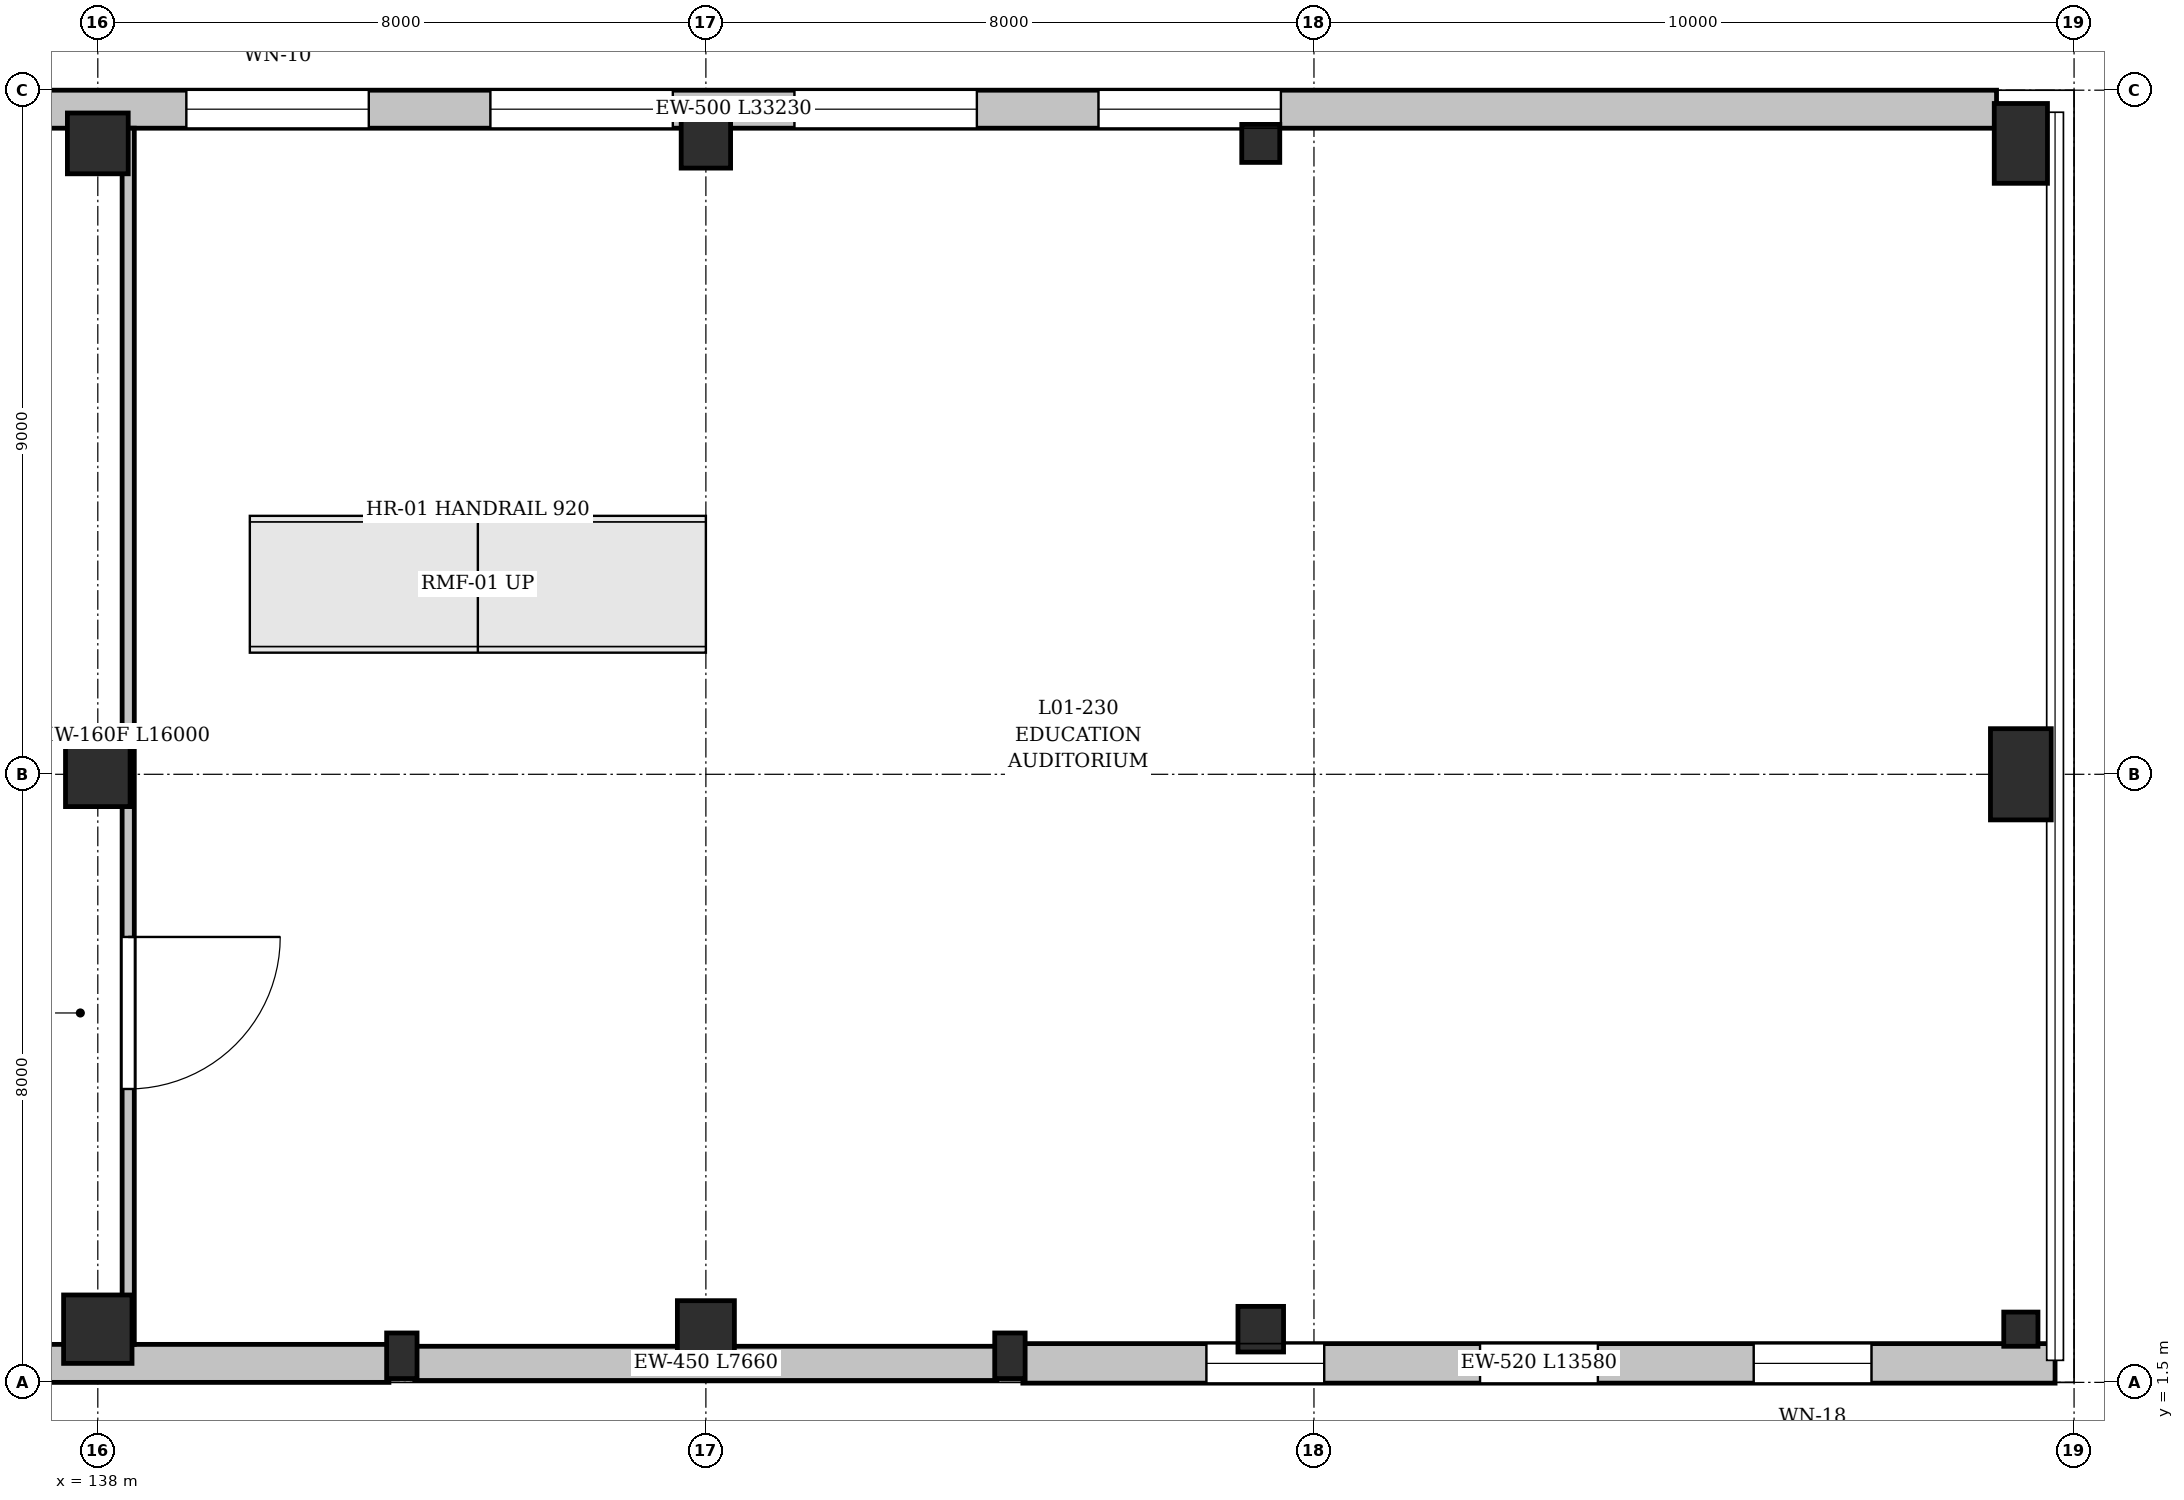
"""IFC4 building model, lengths in metres.
Left out: names, types, materials, properties, quantities, classifications, styles, units other than length and angle.
Written with IfcOpenShell. Run it as: python <this file> out.ifc"""

import sys

from ifc_helpers import new_model, si_unit, direction, frame, frame_2d, origin, origin_2d, place, context, subcontext, project, spatial, rectangle, extrude, element, fill, save


model = new_model("IFC4")
c1 = context("Model", 3, precision=1e-05, world=origin(), true_north=direction((0.0, 1.0)))
c2 = subcontext(c1, "Body", "Model", "MODEL_VIEW")
j1 = project(units=[si_unit("LENGTHUNIT", "METRE"), si_unit("PLANEANGLEUNIT", "RADIAN")], contexts=[c1])
p1 = place(None, origin())
s1 = spatial("IfcSite", under=j1, at=p1, CompositionType="ELEMENT")
p2 = place(p1, origin())
s2 = spatial("IfcBuilding", under=s1, at=p2, CompositionType="ELEMENT")
p3 = place(p2, origin())
s3 = spatial("IfcBuildingStorey", under=s2, at=p3, CompositionType="ELEMENT", Elevation=0.0)
p4 = place(p3, frame((138.0, 2.2, 0.0), z_axis=(0.0, 0.0, 1.0), x_axis=(1.0, 0.0, 0.0)))
e1 = element("IfcColumn", 1, at=p4, inside=s3, PredefinedType="COLUMN", context=c2, shape_type="SweptSolid", body=[
    extrude(rectangle(XDim=0.9, YDim=0.9, at=origin_2d()), origin(), (0.0, 0.0, 1.0), 5.05),
])
p5 = place(p3, frame((138.0, 9.5, 0.0), z_axis=(0.0, 0.0, 1.0), x_axis=(1.0, 0.0, 0.0)))
e2 = element("IfcColumn", 2, at=p5, inside=s3, PredefinedType="COLUMN", context=c2, shape_type="SweptSolid", body=[
    extrude(rectangle(XDim=0.85, YDim=0.85, at=origin_2d()), origin(), (0.0, 0.0, 1.0), 5.05),
])
p6 = place(p3, frame((138.0, 17.8, 0.0), z_axis=(0.0, 0.0, 1.0), x_axis=(1.0, 0.0, 0.0)))
e3 = element("IfcColumn", 3, at=p6, inside=s3, PredefinedType="COLUMN", context=c2, shape_type="SweptSolid", body=[
    extrude(rectangle(XDim=0.8, YDim=0.8, at=origin_2d()), origin(), (0.0, 0.0, 1.0), 5.05),
])
p7 = place(p3, frame((146.0, 2.2, 0.0), z_axis=(0.0, 0.0, 1.0), x_axis=(1.0, 0.0, 0.0)))
e4 = element("IfcColumn", 4, at=p7, inside=s3, PredefinedType="COLUMN", context=c2, shape_type="SweptSolid", body=[
    extrude(rectangle(XDim=0.75, YDim=0.75, at=origin_2d()), origin(), (0.0, 0.0, 1.0), 5.05),
])
p8 = place(p3, frame((146.0, 17.8, 0.0), z_axis=(0.0, 0.0, 1.0), x_axis=(1.0, 0.0, 0.0)))
e5 = element("IfcColumn", 5, at=p8, inside=s3, PredefinedType="COLUMN", context=c2, shape_type="SweptSolid", body=[
    extrude(rectangle(XDim=0.65, YDim=0.65, at=origin_2d()), origin(), (0.0, 0.0, 1.0), 5.05),
])
p9 = place(p3, frame((153.3, 2.2, 0.0), z_axis=(0.0, 0.0, 1.0), x_axis=(1.0, 0.0, 0.0)))
e6 = element("IfcColumn", 6, at=p9, inside=s3, PredefinedType="COLUMN", context=c2, shape_type="SweptSolid", body=[
    extrude(rectangle(XDim=0.6, YDim=0.6, at=origin_2d()), origin(), (0.0, 0.0, 1.0), 5.05),
])
p10 = place(p3, frame((153.3, 17.8, 0.0), z_axis=(0.0, 0.0, 1.0), x_axis=(1.0, 0.0, 0.0)))
e7 = element("IfcColumn", 7, at=p10, inside=s3, PredefinedType="COLUMN", context=c2, shape_type="SweptSolid", body=[
    extrude(rectangle(XDim=0.5, YDim=0.5, at=origin_2d()), origin(), (0.0, 0.0, 1.0), 5.05),
])
p11 = place(p3, frame((163.3, 2.2, 0.0), z_axis=(0.0, 0.0, 1.0), x_axis=(1.0, 0.0, 0.0)))
e8 = element("IfcColumn", 8, at=p11, inside=s3, PredefinedType="COLUMN", context=c2, shape_type="SweptSolid", body=[
    extrude(rectangle(XDim=0.45, YDim=0.45, at=origin_2d()), origin(), (0.0, 0.0, 1.0), 5.05),
])
p12 = place(p3, frame((163.3, 9.5, 0.0), z_axis=(0.0, 0.0, 1.0), x_axis=(1.0, 0.0, 0.0)))
e9 = element("IfcColumn", 9, at=p12, inside=s3, PredefinedType="COLUMN", context=c2, shape_type="SweptSolid", body=[
    extrude(rectangle(XDim=0.8, YDim=1.2, at=origin_2d()), origin(), (0.0, 0.0, 1.0), 5.05),
])
p13 = place(p3, frame((163.3, 17.8, 0.0), z_axis=(0.0, 0.0, 1.0), x_axis=(1.0, 0.0, 0.0)))
e10 = element("IfcColumn", 10, at=p13, inside=s3, PredefinedType="COLUMN", context=c2, shape_type="SweptSolid", body=[
    extrude(rectangle(XDim=0.7, YDim=1.05, at=origin_2d()), origin(), (0.0, 0.0, 1.0), 5.05),
])
for number, where, z_axis, x_axis in (
    (11, (142.0, 1.85, 0.0), (0.0, 0.0, 1.0), (1.0, 0.0, 0.0)),
    (12, (150.0, 1.85, 0.0), (0.0, 0.0, 1.0), (1.0, 0.0, 0.0)),
):
    element("IfcColumn", number, at=place(p3, frame(where, z_axis=z_axis, x_axis=x_axis)), inside=s3, PredefinedType="PILASTER", context=c2, shape_type="SweptSolid", body=[
        extrude(rectangle(XDim=0.4, YDim=0.6, at=origin_2d()), origin(), (0.0, 0.0, 1.0), 5.05),
    ])
p14 = place(p3, frame((129.75, 18.25, 0.0), z_axis=(0.0, 0.0, 1.0), x_axis=(1.0, 0.0, 0.0)))
e13 = element("IfcWall", 13, at=p14, inside=s3, PredefinedType="SOLIDWALL", context=c2, shape_type="SweptSolid", body=[
    extrude(rectangle(XDim=33.23, YDim=0.5, at=frame_2d((16.615, 0.0))), origin(), (0.0, 0.0, 1.0), 3.24),
])
p15 = place(p14, frame((9.415, 0.0, 0.9)))
e14 = element("IfcOpeningElement", 14, at=p15, cuts=e13, PredefinedType="OPENING", context=c2, shape_type="SweptSolid", body=[
    extrude(rectangle(XDim=2.4, YDim=1.1, at=frame_2d((1.2, 0.55))), frame((0.0, 0.26, 0.0), z_axis=(0.0, -1.0, 0.0), x_axis=(1.0, 0.0, 0.0)), (0.0, 0.0, 1.0), 0.52),
])
p16 = place(p14, frame((13.415, 0.0, 0.9)))
e15 = element("IfcOpeningElement", 15, at=p16, cuts=e13, PredefinedType="OPENING", context=c2, shape_type="SweptSolid", body=[
    extrude(rectangle(XDim=2.4, YDim=1.1, at=frame_2d((1.2, 0.55))), frame((0.0, 0.26, 0.0), z_axis=(0.0, -1.0, 0.0), x_axis=(1.0, 0.0, 0.0)), (0.0, 0.0, 1.0), 0.52),
])
p17 = place(p14, frame((17.415, 0.0, 0.9)))
e16 = element("IfcOpeningElement", 16, at=p17, cuts=e13, PredefinedType="OPENING", context=c2, shape_type="SweptSolid", body=[
    extrude(rectangle(XDim=2.4, YDim=1.1, at=frame_2d((1.2, 0.55))), frame((0.0, 0.26, 0.0), z_axis=(0.0, -1.0, 0.0), x_axis=(1.0, 0.0, 0.0)), (0.0, 0.0, 1.0), 0.52),
])
p18 = place(p14, frame((21.415, 0.0, 0.9)))
e17 = element("IfcOpeningElement", 17, at=p18, cuts=e13, PredefinedType="OPENING", context=c2, shape_type="SweptSolid", body=[
    extrude(rectangle(XDim=2.4, YDim=1.1, at=frame_2d((1.2, 0.55))), frame((0.0, 0.26, 0.0), z_axis=(0.0, -1.0, 0.0), x_axis=(1.0, 0.0, 0.0)), (0.0, 0.0, 1.0), 0.52),
])
p19 = place(p3, frame((163.75, 1.75, 0.0), z_axis=(0.0, 0.0, 1.0), x_axis=(-1.0, 0.0, 0.0)))
e18 = element("IfcWall", 18, at=p19, inside=s3, PredefinedType="SOLIDWALL", context=c2, shape_type="SweptSolid", body=[
    extrude(rectangle(XDim=13.58, YDim=0.52, at=frame_2d((6.79, 0.0))), origin(), (0.0, 0.0, 1.0), 3.24),
])
p20 = place(p19, frame((2.415, 0.0, 0.9)))
e19 = element("IfcOpeningElement", 19, at=p20, cuts=e18, PredefinedType="OPENING", context=c2, shape_type="SweptSolid", body=[
    extrude(rectangle(XDim=1.55, YDim=1.85, at=frame_2d((0.775, 0.925))), frame((0.0, 0.27, 0.0), z_axis=(0.0, -1.0, 0.0), x_axis=(1.0, 0.0, 0.0)), (0.0, 0.0, 1.0), 0.54),
])
p21 = place(p19, frame((6.015, 0.0, 0.9)))
e20 = element("IfcOpeningElement", 20, at=p21, cuts=e18, PredefinedType="OPENING", context=c2, shape_type="SweptSolid", body=[
    extrude(rectangle(XDim=1.55, YDim=1.85, at=frame_2d((0.775, 0.925))), frame((0.0, 0.27, 0.0), z_axis=(0.0, -1.0, 0.0), x_axis=(1.0, 0.0, 0.0)), (0.0, 0.0, 1.0), 0.54),
])
p22 = place(p19, frame((9.615, 0.0, 0.9)))
e21 = element("IfcOpeningElement", 21, at=p22, cuts=e18, PredefinedType="OPENING", context=c2, shape_type="SweptSolid", body=[
    extrude(rectangle(XDim=1.55, YDim=1.85, at=frame_2d((0.775, 0.925))), frame((0.0, 0.27, 0.0), z_axis=(0.0, -1.0, 0.0), x_axis=(1.0, 0.0, 0.0)), (0.0, 0.0, 1.0), 0.54),
])
p23 = place(p3, frame((149.83, 1.75, 0.0), z_axis=(0.0, 0.0, 1.0), x_axis=(-1.0, 0.0, 0.0)))
e22 = element("IfcWall", 22, at=p23, inside=s3, PredefinedType="SOLIDWALL", context=c2, shape_type="SweptSolid", body=[
    extrude(rectangle(XDim=7.66, YDim=0.45, at=frame_2d((3.83, 0.0))), origin(), (0.0, 0.0, 1.0), 3.24),
])
p24 = place(p3, frame((141.83, 1.75, 0.0), z_axis=(0.0, 0.0, 1.0), x_axis=(-1.0, 0.0, 0.0)))
e23 = element("IfcWall", 23, at=p24, inside=s3, PredefinedType="SOLIDWALL", context=c2, shape_type="SweptSolid", body=[
    extrude(rectangle(XDim=7.46, YDim=0.5, at=frame_2d((3.73, 0.0))), origin(), (0.0, 0.0, 1.0), 4.04),
])
p25 = place(p3, frame((138.4, 18.0, 0.0), z_axis=(0.0, 0.0, 1.0), x_axis=(0.0, -1.0, 0.0)))
e24 = element("IfcWall", 24, at=p25, inside=s3, PredefinedType="PARTITIONING", context=c2, shape_type="SweptSolid", body=[
    extrude(rectangle(XDim=16.0, YDim=0.16, at=frame_2d((8.0, 0.0))), origin(), (0.0, 0.0, 1.0), 3.74),
])
p26 = place(p25, frame((10.64, 0.0, 0.0)))
e25 = element("IfcOpeningElement", 25, at=p26, cuts=e24, PredefinedType="OPENING", context=c2, shape_type="SweptSolid", body=[
    extrude(rectangle(XDim=2.0, YDim=2.4, at=frame_2d((1.0, 1.2))), frame((0.0, 0.09, 0.0), z_axis=(0.0, -1.0, 0.0), x_axis=(1.0, 0.0, 0.0)), (0.0, 0.0, 1.0), 0.18),
])
p27 = place(p15, origin())
e26 = element("IfcWindow", 26, at=p27, inside=s3, PartitioningType="DOUBLE_PANEL_HORIZONTAL", PredefinedType="LIGHTDOME", context=c2, shape_type="SweptSolid", body=[
    extrude(rectangle(XDim=2.4, YDim=1.1, at=frame_2d((1.2, 0.55))), frame((0.0, 0.03, 0.0), z_axis=(0.0, -1.0, 0.0), x_axis=(1.0, 0.0, 0.0)), (0.0, 0.0, 1.0), 0.06),
])
fill(e14, e26)
p28 = place(p16, origin())
e27 = element("IfcWindow", 27, at=p28, inside=s3, PartitioningType="DOUBLE_PANEL_HORIZONTAL", PredefinedType="LIGHTDOME", context=c2, shape_type="SweptSolid", body=[
    extrude(rectangle(XDim=2.4, YDim=1.1, at=frame_2d((1.2, 0.55))), frame((0.0, 0.03, 0.0), z_axis=(0.0, -1.0, 0.0), x_axis=(1.0, 0.0, 0.0)), (0.0, 0.0, 1.0), 0.06),
])
fill(e15, e27)
p29 = place(p17, origin())
e28 = element("IfcWindow", 28, at=p29, inside=s3, PartitioningType="DOUBLE_PANEL_HORIZONTAL", PredefinedType="LIGHTDOME", context=c2, shape_type="SweptSolid", body=[
    extrude(rectangle(XDim=2.4, YDim=1.1, at=frame_2d((1.2, 0.55))), frame((0.0, 0.03, 0.0), z_axis=(0.0, -1.0, 0.0), x_axis=(1.0, 0.0, 0.0)), (0.0, 0.0, 1.0), 0.06),
])
fill(e16, e28)
p30 = place(p18, origin())
e29 = element("IfcWindow", 29, at=p30, inside=s3, PartitioningType="DOUBLE_PANEL_HORIZONTAL", PredefinedType="LIGHTDOME", context=c2, shape_type="SweptSolid", body=[
    extrude(rectangle(XDim=2.4, YDim=1.1, at=frame_2d((1.2, 0.55))), frame((0.0, 0.03, 0.0), z_axis=(0.0, -1.0, 0.0), x_axis=(1.0, 0.0, 0.0)), (0.0, 0.0, 1.0), 0.06),
])
fill(e17, e29)
p31 = place(p20, origin())
e30 = element("IfcWindow", 30, at=p31, inside=s3, PartitioningType="DOUBLE_PANEL_VERTICAL", PredefinedType="WINDOW", context=c2, shape_type="SweptSolid", body=[
    extrude(rectangle(XDim=1.55, YDim=1.85, at=frame_2d((0.775, 0.925))), frame((0.0, 0.03, 0.0), z_axis=(0.0, -1.0, 0.0), x_axis=(1.0, 0.0, 0.0)), (0.0, 0.0, 1.0), 0.06),
])
fill(e19, e30)
p32 = place(p21, origin())
e31 = element("IfcWindow", 31, at=p32, inside=s3, PartitioningType="DOUBLE_PANEL_VERTICAL", PredefinedType="WINDOW", context=c2, shape_type="SweptSolid", body=[
    extrude(rectangle(XDim=1.55, YDim=1.85, at=frame_2d((0.775, 0.925))), frame((0.0, 0.03, 0.0), z_axis=(0.0, -1.0, 0.0), x_axis=(1.0, 0.0, 0.0)), (0.0, 0.0, 1.0), 0.06),
])
fill(e20, e31)
p33 = place(p22, origin())
e32 = element("IfcWindow", 32, at=p33, inside=s3, PartitioningType="DOUBLE_PANEL_VERTICAL", PredefinedType="WINDOW", context=c2, shape_type="SweptSolid", body=[
    extrude(rectangle(XDim=1.55, YDim=1.85, at=frame_2d((0.775, 0.925))), frame((0.0, 0.03, 0.0), z_axis=(0.0, -1.0, 0.0), x_axis=(1.0, 0.0, 0.0)), (0.0, 0.0, 1.0), 0.06),
])
fill(e21, e32)
p34 = place(p26, origin())
e33 = element("IfcDoor", 33, at=p34, inside=s3, OperationType="DOUBLE_DOOR_DOUBLE_SWING", PredefinedType="DOOR", context=c2, shape_type="SweptSolid", body=[
    extrude(rectangle(XDim=2.0, YDim=2.4, at=frame_2d((1.0, 1.2))), frame((0.0, 0.025, 0.0), z_axis=(0.0, -1.0, 0.0), x_axis=(1.0, 0.0, 0.0)), (0.0, 0.0, 1.0), 0.05),
])
fill(e25, e33)
save(model, sys.argv[1])
